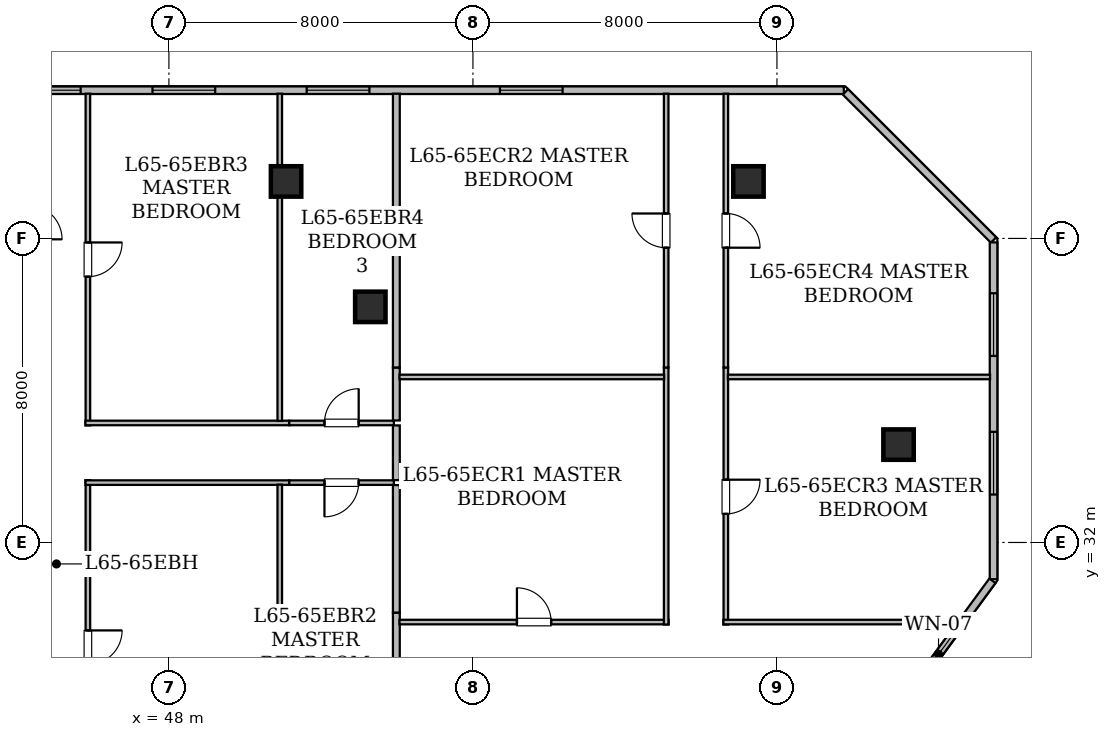
"""IFC4 building model, lengths in metres.
Left out: names, types, materials, properties, quantities, classifications, styles, units other than length and angle.
Written with IfcOpenShell. Run it as: python <this file> out.ifc"""

import sys

from ifc_helpers import new_model, si_unit, direction, frame, frame_2d, origin, origin_2d, place, context, subcontext, project, spatial, rectangle, hollow_rectangle, extrude, element, fill, save


model = new_model("IFC4")
c1 = context("Model", 3, precision=1e-05, world=origin(), true_north=direction((0.0, 1.0)))
c2 = subcontext(c1, "Body", "Model", "MODEL_VIEW")
j1 = project(units=[si_unit("LENGTHUNIT", "METRE"), si_unit("PLANEANGLEUNIT", "RADIAN")], contexts=[c1])
p1 = place(None, origin())
s1 = spatial("IfcSite", under=j1, at=p1, CompositionType="ELEMENT")
p2 = place(p1, origin())
s2 = spatial("IfcBuilding", under=s1, at=p2, CompositionType="ELEMENT")
p3 = place(p2, frame((0.0, 0.0, 253.7)))
s3 = spatial("IfcBuildingStorey", under=s2, at=p3, CompositionType="ELEMENT", Elevation=253.7)
for number, where, z_axis, x_axis in (
    (1, (51.083, 41.5, 0.0), (0.0, 0.0, 1.0), (1.0, 0.0, 0.0)),
    (2, (63.25, 41.5, 0.0), (0.0, 0.0, 1.0), (1.0, 0.0, 0.0)),
    (3, (67.2, 34.575, 0.0), (0.0, 0.0, 1.0), (1.0, 0.0, 0.0)),
    (4, (53.3, 38.2, 0.0), (0.0, 0.0, 1.0), (1.0, 0.0, 0.0)),
):
    element("IfcColumn", number, at=place(p3, frame(where, z_axis=z_axis, x_axis=x_axis)), inside=s3, PredefinedType="COLUMN", context=c2, shape_type="SweptSolid", body=[
        extrude(hollow_rectangle(XDim=0.8, YDim=0.8, WallThickness=0.04, at=origin_2d()), origin(), (0.0, 0.0, 1.0), 3.65),
    ])
p4 = place(p3, frame((24.302, 43.9, 0.0), z_axis=(0.0, 0.0, 1.0), x_axis=(1.0, 0.0, 0.0)))
e5 = element("IfcWall", 5, at=p4, inside=s3, PredefinedType="STANDARD", context=c2, shape_type="SweptSolid", body=[
    extrude(rectangle(XDim=41.457, YDim=0.2, at=frame_2d((20.729, 0.0))), origin(), (0.0, 0.0, 1.0), 3.43),
])
p5 = place(p4, frame((4.673, 0.0, 0.85)))
e6 = element("IfcOpeningElement", 6, at=p5, cuts=e5, PredefinedType="OPENING", context=c2, shape_type="SweptSolid", body=[
    extrude(rectangle(XDim=1.65, YDim=1.55, at=frame_2d((0.825, 0.775))), frame((0.0, 0.11, 0.0), z_axis=(0.0, -1.0, 0.0), x_axis=(1.0, 0.0, 0.0)), (0.0, 0.0, 1.0), 0.22),
])
p6 = place(p4, frame((12.063, 0.0, 0.85)))
e7 = element("IfcOpeningElement", 7, at=p6, cuts=e5, PredefinedType="OPENING", context=c2, shape_type="SweptSolid", body=[
    extrude(rectangle(XDim=1.65, YDim=1.55, at=frame_2d((0.825, 0.775))), frame((0.0, 0.11, 0.0), z_axis=(0.0, -1.0, 0.0), x_axis=(1.0, 0.0, 0.0)), (0.0, 0.0, 1.0), 0.22),
])
p7 = place(p4, frame((14.905, 0.0, 0.85)))
e8 = element("IfcOpeningElement", 8, at=p7, cuts=e5, PredefinedType="OPENING", context=c2, shape_type="SweptSolid", body=[
    extrude(rectangle(XDim=1.65, YDim=1.55, at=frame_2d((0.825, 0.775))), frame((0.0, 0.11, 0.0), z_axis=(0.0, -1.0, 0.0), x_axis=(1.0, 0.0, 0.0)), (0.0, 0.0, 1.0), 0.22),
])
p8 = place(p4, frame((17.825, 0.0, 0.85)))
e9 = element("IfcOpeningElement", 9, at=p8, cuts=e5, PredefinedType="OPENING", context=c2, shape_type="SweptSolid", body=[
    extrude(rectangle(XDim=1.65, YDim=1.55, at=frame_2d((0.825, 0.775))), frame((0.0, 0.11, 0.0), z_axis=(0.0, -1.0, 0.0), x_axis=(1.0, 0.0, 0.0)), (0.0, 0.0, 1.0), 0.22),
])
p9 = place(p4, frame((20.176, 0.0, 0.8)))
e10 = element("IfcOpeningElement", 10, at=p9, cuts=e5, PredefinedType="OPENING", context=c2, shape_type="SweptSolid", body=[
    extrude(rectangle(XDim=1.2, YDim=1.5, at=frame_2d((0.6, 0.75))), frame((0.0, 0.11, 0.0), z_axis=(0.0, -1.0, 0.0), x_axis=(1.0, 0.0, 0.0)), (0.0, 0.0, 1.0), 0.22),
])
p10 = place(p4, frame((23.266, 0.0, 0.85)))
e11 = element("IfcOpeningElement", 11, at=p10, cuts=e5, PredefinedType="OPENING", context=c2, shape_type="SweptSolid", body=[
    extrude(rectangle(XDim=1.65, YDim=1.55, at=frame_2d((0.825, 0.775))), frame((0.0, 0.11, 0.0), z_axis=(0.0, -1.0, 0.0), x_axis=(1.0, 0.0, 0.0)), (0.0, 0.0, 1.0), 0.22),
])
p11 = place(p4, frame((27.324, 0.0, 0.85)))
e12 = element("IfcOpeningElement", 12, at=p11, cuts=e5, PredefinedType="OPENING", context=c2, shape_type="SweptSolid", body=[
    extrude(rectangle(XDim=1.65, YDim=1.55, at=frame_2d((0.825, 0.775))), frame((0.0, 0.11, 0.0), z_axis=(0.0, -1.0, 0.0), x_axis=(1.0, 0.0, 0.0)), (0.0, 0.0, 1.0), 0.22),
])
p12 = place(p4, frame((32.408, 0.0, 0.85)))
e13 = element("IfcOpeningElement", 13, at=p12, cuts=e5, PredefinedType="OPENING", context=c2, shape_type="SweptSolid", body=[
    extrude(rectangle(XDim=1.65, YDim=1.55, at=frame_2d((0.825, 0.775))), frame((0.0, 0.11, 0.0), z_axis=(0.0, -1.0, 0.0), x_axis=(1.0, 0.0, 0.0)), (0.0, 0.0, 1.0), 0.22),
])
p13 = place(p3, frame((65.802, 43.857, 0.0), z_axis=(0.0, 0.0, 1.0), x_axis=(0.707106781187, -0.707106781187, 0.0)))
e14 = element("IfcWall", 14, at=p13, inside=s3, PredefinedType="STANDARD", context=c2, shape_type="SweptSolid", body=[
    extrude(rectangle(XDim=5.512, YDim=0.2, at=frame_2d((2.756, 0.0))), origin(), (0.0, 0.0, 1.0), 3.43),
])
p14 = place(p3, frame((69.7, 39.896, 0.0), z_axis=(0.0, 0.0, 1.0), x_axis=(0.0, -1.0, 0.0)))
e15 = element("IfcWall", 15, at=p14, inside=s3, PredefinedType="STANDARD", context=c2, shape_type="SweptSolid", body=[
    extrude(rectangle(XDim=8.863, YDim=0.2, at=frame_2d((4.432, 0.0))), origin(), (0.0, 0.0, 1.0), 3.43),
])
p15 = place(p14, frame((4.985, 0.0, 0.85)))
e16 = element("IfcOpeningElement", 16, at=p15, cuts=e15, PredefinedType="OPENING", context=c2, shape_type="SweptSolid", body=[
    extrude(rectangle(XDim=1.65, YDim=1.55, at=frame_2d((0.825, 0.775))), frame((0.0, 0.11, 0.0), z_axis=(0.0, -1.0, 0.0), x_axis=(1.0, 0.0, 0.0)), (0.0, 0.0, 1.0), 0.22),
])
p16 = place(p14, frame((1.338, 0.0, 0.85)))
e17 = element("IfcOpeningElement", 17, at=p16, cuts=e15, PredefinedType="OPENING", context=c2, shape_type="SweptSolid", body=[
    extrude(rectangle(XDim=1.65, YDim=1.55, at=frame_2d((0.825, 0.775))), frame((0.0, 0.11, 0.0), z_axis=(0.0, -1.0, 0.0), x_axis=(1.0, 0.0, 0.0)), (0.0, 0.0, 1.0), 0.22),
])
p17 = place(p3, frame((69.67, 30.992, 0.0), z_axis=(0.0, 0.0, 1.0), x_axis=(-0.591320870733, -0.806436375566, 0.0)))
e18 = element("IfcWall", 18, at=p17, inside=s3, PredefinedType="STANDARD", context=c2, shape_type="SweptSolid", body=[
    extrude(rectangle(XDim=3.71, YDim=0.2, at=frame_2d((1.855, 0.0))), origin(), (0.0, 0.0, 1.0), 3.43),
])
p18 = place(p17, frame((1.723, 0.0, 0.85)))
e19 = element("IfcOpeningElement", 19, at=p18, cuts=e18, PredefinedType="OPENING", context=c2, shape_type="SweptSolid", body=[
    extrude(rectangle(XDim=1.35, YDim=1.5, at=frame_2d((0.675, 0.75))), frame((0.0, 0.11, 0.0), z_axis=(0.0, -1.0, 0.0), x_axis=(1.0, 0.0, 0.0)), (0.0, 0.0, 1.0), 0.22),
])
p19 = place(p3, frame((45.868, 33.64, 0.0), z_axis=(0.0, 0.0, 1.0), x_axis=(0.0, -1.0, 0.0)))
e20 = element("IfcWall", 20, at=p19, inside=s3, PredefinedType="PARTITIONING", context=c2, shape_type="SweptSolid", body=[
    extrude(rectangle(XDim=8.808, YDim=0.12, at=frame_2d((4.404, 0.0))), origin(), (0.0, 0.0, 1.0), 3.013),
])
p20 = place(p19, frame((3.954, 0.0, 0.0)))
e21 = element("IfcOpeningElement", 21, at=p20, cuts=e20, PredefinedType="OPENING", context=c2, shape_type="SweptSolid", body=[
    extrude(rectangle(XDim=0.9, YDim=2.1, at=frame_2d((0.45, 1.05))), frame((0.0, 0.07, 0.0), z_axis=(0.0, -1.0, 0.0), x_axis=(1.0, 0.0, 0.0)), (0.0, 0.0, 1.0), 0.14),
])
p21 = place(p3, frame((51.167, 33.575, 0.0), z_axis=(0.0, 0.0, 1.0), x_axis=(-1.0, 0.0, 0.0)))
e22 = element("IfcWall", 22, at=p21, inside=s3, PredefinedType="PARTITIONING", context=c2, shape_type="SweptSolid", body=[
    extrude(rectangle(XDim=5.364, YDim=0.12, at=frame_2d((2.682, 0.0))), origin(), (0.0, 0.0, 1.0), 3.013),
])
p22 = place(p3, frame((53.92, 33.575, 0.0), z_axis=(0.0, 0.0, 1.0), x_axis=(-1.0, 0.0, 0.0)))
e23 = element("IfcWall", 23, at=p22, inside=s3, PredefinedType="PARTITIONING", context=c2, shape_type="SweptSolid", body=[
    extrude(rectangle(XDim=2.753, YDim=0.12, at=frame_2d((1.376, 0.0))), origin(), (0.0, 0.0, 1.0), 2.725),
])
p23 = place(p22, frame((0.927, 0.0, 0.0)))
e24 = element("IfcOpeningElement", 24, at=p23, cuts=e23, PredefinedType="OPENING", context=c2, shape_type="SweptSolid", body=[
    extrude(rectangle(XDim=0.9, YDim=2.1, at=frame_2d((0.45, 1.05))), frame((0.0, 0.07, 0.0), z_axis=(0.0, -1.0, 0.0), x_axis=(1.0, 0.0, 0.0)), (0.0, 0.0, 1.0), 0.14),
])
p24 = place(p3, frame((45.868, 43.808, 0.0), z_axis=(0.0, 0.0, 1.0), x_axis=(0.0, -1.0, 0.0)))
e25 = element("IfcWall", 25, at=p24, inside=s3, PredefinedType="PARTITIONING", context=c2, shape_type="SweptSolid", body=[
    extrude(rectangle(XDim=8.728, YDim=0.12, at=frame_2d((4.364, 0.0))), origin(), (0.0, 0.0, 1.0), 2.725),
])
p25 = place(p24, frame((3.914, 0.0, 0.0)))
e26 = element("IfcOpeningElement", 26, at=p25, cuts=e25, PredefinedType="OPENING", context=c2, shape_type="SweptSolid", body=[
    extrude(rectangle(XDim=0.9, YDim=2.1, at=frame_2d((0.45, 1.05))), frame((0.0, 0.07, 0.0), z_axis=(0.0, -1.0, 0.0), x_axis=(1.0, 0.0, 0.0)), (0.0, 0.0, 1.0), 0.14),
])
p26 = place(p3, frame((45.803, 35.145, 0.0), z_axis=(0.0, 0.0, 1.0), x_axis=(1.0, 0.0, 0.0)))
e27 = element("IfcWall", 27, at=p26, inside=s3, PredefinedType="PARTITIONING", context=c2, shape_type="SweptSolid", body=[
    extrude(rectangle(XDim=5.364, YDim=0.12, at=frame_2d((2.682, 0.0))), origin(), (0.0, 0.0, 1.0), 3.43),
])
p27 = place(p3, frame((51.167, 35.145, 0.0), z_axis=(0.0, 0.0, 1.0), x_axis=(1.0, 0.0, 0.0)))
e28 = element("IfcWall", 28, at=p27, inside=s3, PredefinedType="PARTITIONING", context=c2, shape_type="SweptSolid", body=[
    extrude(rectangle(XDim=2.753, YDim=0.12, at=frame_2d((1.376, 0.0))), origin(), (0.0, 0.0, 1.0), 2.725),
])
p28 = place(p27, frame((0.927, 0.0, 0.0)))
e29 = element("IfcOpeningElement", 29, at=p28, cuts=e28, PredefinedType="OPENING", context=c2, shape_type="SweptSolid", body=[
    extrude(rectangle(XDim=0.9, YDim=2.1, at=frame_2d((0.45, 1.05))), frame((0.0, 0.07, 0.0), z_axis=(0.0, -1.0, 0.0), x_axis=(1.0, 0.0, 0.0)), (0.0, 0.0, 1.0), 0.14),
])
p29 = place(p3, frame((53.985, 35.08, 0.0), z_axis=(0.0, 0.0, 1.0), x_axis=(0.0, -1.0, 0.0)))
e30 = element("IfcWall", 30, at=p29, inside=s3, PredefinedType="STANDARD", context=c2, shape_type="SweptSolid", body=[
    extrude(rectangle(XDim=1.44, YDim=0.18, at=frame_2d((0.72, 0.0))), origin(), (0.0, 0.0, 1.0), 3.43),
])
p30 = place(p3, frame((50.917, 33.521, 0.0), z_axis=(0.0, 0.0, 1.0), x_axis=(0.0, -1.0, 0.0)))
e31 = element("IfcWall", 31, at=p30, inside=s3, PredefinedType="PARTITIONING", context=c2, shape_type="SweptSolid", body=[
    extrude(rectangle(XDim=8.689, YDim=0.12, at=frame_2d((4.344, 0.0))), origin(), (0.0, 0.0, 1.0), 3.013),
])
p31 = place(p3, frame((53.985, 30.155, 0.0), z_axis=(0.0, 0.0, 1.0), x_axis=(0.0, -1.0, 0.0)))
e32 = element("IfcWall", 32, at=p31, inside=s3, PredefinedType="STANDARD", context=c2, shape_type="SweptSolid", body=[
    extrude(rectangle(XDim=2.078, YDim=0.18, at=frame_2d((1.039, 0.0))), origin(), (0.0, 0.0, 1.0), 3.43),
])
p32 = place(p3, frame((53.985, 33.51, 0.0), z_axis=(0.0, 0.0, 1.0), x_axis=(0.0, -1.0, 0.0)))
e33 = element("IfcWall", 33, at=p32, inside=s3, PredefinedType="STANDARD", context=c2, shape_type="SweptSolid", body=[
    extrude(rectangle(XDim=3.355, YDim=0.18, at=frame_2d((1.677, 0.0))), origin(), (0.0, 0.0, 1.0), 3.013),
])
p33 = place(p3, frame((50.917, 43.808, 0.0), z_axis=(0.0, 0.0, 1.0), x_axis=(0.0, -1.0, 0.0)))
e34 = element("IfcWall", 34, at=p33, inside=s3, PredefinedType="PARTITIONING", context=c2, shape_type="SweptSolid", body=[
    extrude(rectangle(XDim=8.609, YDim=0.12, at=frame_2d((4.305, 0.0))), origin(), (0.0, 0.0, 1.0), 2.725),
])
p34 = place(p3, frame((53.985, 36.604, 0.0), z_axis=(0.0, 0.0, 1.0), x_axis=(0.0, -1.0, 0.0)))
e35 = element("IfcWall", 35, at=p34, inside=s3, PredefinedType="STANDARD", context=c2, shape_type="SweptSolid", body=[
    extrude(rectangle(XDim=1.394, YDim=0.18, at=frame_2d((0.697, 0.0))), origin(), (0.0, 0.0, 1.0), 3.43),
])
p35 = place(p3, frame((53.985, 43.808, 0.0), z_axis=(0.0, 0.0, 1.0), x_axis=(0.0, -1.0, 0.0)))
e36 = element("IfcWall", 36, at=p35, inside=s3, PredefinedType="STANDARD", context=c2, shape_type="SweptSolid", body=[
    extrude(rectangle(XDim=7.204, YDim=0.18, at=frame_2d((3.602, 0.0))), origin(), (0.0, 0.0, 1.0), 2.725),
])
p36 = place(p3, frame((54.067, 29.906, 0.0), z_axis=(0.0, 0.0, 1.0), x_axis=(1.0, 0.0, 0.0)))
e37 = element("IfcWall", 37, at=p36, inside=s3, PredefinedType="PARTITIONING", context=c2, shape_type="SweptSolid", body=[
    extrude(rectangle(XDim=7.083, YDim=0.12, at=frame_2d((3.542, 0.0))), origin(), (0.0, 0.0, 1.0), 3.43),
])
p37 = place(p36, frame((3.091, 0.0, 0.0)))
e38 = element("IfcOpeningElement", 38, at=p37, cuts=e37, PredefinedType="OPENING", context=c2, shape_type="SweptSolid", body=[
    extrude(rectangle(XDim=0.9, YDim=2.1, at=frame_2d((0.45, 1.05))), frame((0.0, 0.07, 0.0), z_axis=(0.0, -1.0, 0.0), x_axis=(1.0, 0.0, 0.0)), (0.0, 0.0, 1.0), 0.14),
])
p38 = place(p3, frame((61.085, 29.841, 0.0), z_axis=(0.0, 0.0, 1.0), x_axis=(0.0, 1.0, 0.0)))
e39 = element("IfcWall", 39, at=p38, inside=s3, PredefinedType="PARTITIONING", context=c2, shape_type="SweptSolid", body=[
    extrude(rectangle(XDim=6.763, YDim=0.12, at=frame_2d((3.381, 0.0))), origin(), (0.0, 0.0, 1.0), 2.725),
])
p39 = place(p3, frame((61.085, 36.604, 0.0), z_axis=(0.0, 0.0, 1.0), x_axis=(0.0, 1.0, 0.0)))
e40 = element("IfcWall", 40, at=p39, inside=s3, PredefinedType="PARTITIONING", context=c2, shape_type="SweptSolid", body=[
    extrude(rectangle(XDim=7.204, YDim=0.12, at=frame_2d((3.602, 0.0))), origin(), (0.0, 0.0, 1.0), 2.725),
])
p40 = place(p39, frame((3.152, 0.0, 0.0)))
e41 = element("IfcOpeningElement", 41, at=p40, cuts=e40, PredefinedType="OPENING", context=c2, shape_type="SweptSolid", body=[
    extrude(rectangle(XDim=0.9, YDim=2.1, at=frame_2d((0.45, 1.05))), frame((0.0, 0.07, 0.0), z_axis=(0.0, -1.0, 0.0), x_axis=(1.0, 0.0, 0.0)), (0.0, 0.0, 1.0), 0.14),
])
p41 = place(p3, frame((62.655, 36.604, 0.0), z_axis=(0.0, 0.0, 1.0), x_axis=(0.0, -1.0, 0.0)))
e42 = element("IfcWall", 42, at=p41, inside=s3, PredefinedType="PARTITIONING", context=c2, shape_type="SweptSolid", body=[
    extrude(rectangle(XDim=6.763, YDim=0.12, at=frame_2d((3.381, 0.0))), origin(), (0.0, 0.0, 1.0), 2.725),
])
p42 = place(p41, frame((2.952, 0.0, 0.0)))
e43 = element("IfcOpeningElement", 43, at=p42, cuts=e42, PredefinedType="OPENING", context=c2, shape_type="SweptSolid", body=[
    extrude(rectangle(XDim=0.9, YDim=2.1, at=frame_2d((0.45, 1.05))), frame((0.0, 0.07, 0.0), z_axis=(0.0, -1.0, 0.0), x_axis=(1.0, 0.0, 0.0)), (0.0, 0.0, 1.0), 0.14),
])
p43 = place(p3, frame((62.59, 29.906, 0.0), z_axis=(0.0, 0.0, 1.0), x_axis=(1.0, 0.0, 0.0)))
e44 = element("IfcWall", 44, at=p43, inside=s3, PredefinedType="PARTITIONING", context=c2, shape_type="SweptSolid", body=[
    extrude(rectangle(XDim=6.18, YDim=0.12, at=frame_2d((3.09, 0.0))), origin(), (0.0, 0.0, 1.0), 2.887),
])
p44 = place(p3, frame((62.655, 43.808, 0.0), z_axis=(0.0, 0.0, 1.0), x_axis=(0.0, -1.0, 0.0)))
e45 = element("IfcWall", 45, at=p44, inside=s3, PredefinedType="PARTITIONING", context=c2, shape_type="SweptSolid", body=[
    extrude(rectangle(XDim=7.204, YDim=0.12, at=frame_2d((3.602, 0.0))), origin(), (0.0, 0.0, 1.0), 2.725),
])
p45 = place(p44, frame((3.152, 0.0, 0.0)))
e46 = element("IfcOpeningElement", 46, at=p45, cuts=e45, PredefinedType="OPENING", context=c2, shape_type="SweptSolid", body=[
    extrude(rectangle(XDim=0.9, YDim=2.1, at=frame_2d((0.45, 1.05))), frame((0.0, 0.07, 0.0), z_axis=(0.0, -1.0, 0.0), x_axis=(1.0, 0.0, 0.0)), (0.0, 0.0, 1.0), 0.14),
])
p46 = place(p3, frame((54.067, 36.355, 0.0), z_axis=(0.0, 0.0, 1.0), x_axis=(1.0, 0.0, 0.0)))
e47 = element("IfcWall", 47, at=p46, inside=s3, PredefinedType="PARTITIONING", context=c2, shape_type="SweptSolid", body=[
    extrude(rectangle(XDim=6.964, YDim=0.12, at=frame_2d((3.482, 0.0))), origin(), (0.0, 0.0, 1.0), 2.725),
])
p47 = place(p3, frame((62.709, 36.355, 0.0), z_axis=(0.0, 0.0, 1.0), x_axis=(1.0, 0.0, 0.0)))
e48 = element("IfcWall", 48, at=p47, inside=s3, PredefinedType="PARTITIONING", context=c2, shape_type="SweptSolid", body=[
    extrude(rectangle(XDim=6.899, YDim=0.12, at=frame_2d((3.449, 0.0))), origin(), (0.0, 0.0, 1.0), 2.887),
])
p48 = place(p9, origin())
e49 = element("IfcWindow", 49, at=p48, inside=s3, PartitioningType="SINGLE_PANEL", PredefinedType="WINDOW", context=c2, shape_type="SweptSolid", body=[
    extrude(rectangle(XDim=1.2, YDim=1.5, at=frame_2d((0.6, 0.75))), frame((0.0, 0.03, 0.0), z_axis=(0.0, -1.0, 0.0), x_axis=(1.0, 0.0, 0.0)), (0.0, 0.0, 1.0), 0.06),
])
fill(e10, e49)
p49 = place(p10, origin())
e50 = element("IfcWindow", 50, at=p49, inside=s3, PartitioningType="SINGLE_PANEL", PredefinedType="WINDOW", context=c2, shape_type="SweptSolid", body=[
    extrude(rectangle(XDim=1.65, YDim=1.55, at=frame_2d((0.825, 0.775))), frame((0.0, 0.03, 0.0), z_axis=(0.0, -1.0, 0.0), x_axis=(1.0, 0.0, 0.0)), (0.0, 0.0, 1.0), 0.06),
])
fill(e11, e50)
p50 = place(p11, origin())
e51 = element("IfcWindow", 51, at=p50, inside=s3, PartitioningType="SINGLE_PANEL", PredefinedType="WINDOW", context=c2, shape_type="SweptSolid", body=[
    extrude(rectangle(XDim=1.65, YDim=1.55, at=frame_2d((0.825, 0.775))), frame((0.0, 0.03, 0.0), z_axis=(0.0, -1.0, 0.0), x_axis=(1.0, 0.0, 0.0)), (0.0, 0.0, 1.0), 0.06),
])
fill(e12, e51)
p51 = place(p18, origin())
e52 = element("IfcWindow", 52, at=p51, inside=s3, PartitioningType="SINGLE_PANEL", PredefinedType="WINDOW", context=c2, shape_type="SweptSolid", body=[
    extrude(rectangle(XDim=1.35, YDim=1.5, at=frame_2d((0.675, 0.75))), frame((0.0, 0.03, 0.0), z_axis=(0.0, -1.0, 0.0), x_axis=(1.0, 0.0, 0.0)), (0.0, 0.0, 1.0), 0.06),
])
fill(e19, e52)
p52 = place(p12, origin())
e53 = element("IfcWindow", 53, at=p52, inside=s3, PartitioningType="SINGLE_PANEL", PredefinedType="WINDOW", context=c2, shape_type="SweptSolid", body=[
    extrude(rectangle(XDim=1.65, YDim=1.55, at=frame_2d((0.825, 0.775))), frame((0.0, 0.03, 0.0), z_axis=(0.0, -1.0, 0.0), x_axis=(1.0, 0.0, 0.0)), (0.0, 0.0, 1.0), 0.06),
])
fill(e13, e53)
p53 = place(p15, origin())
e54 = element("IfcWindow", 54, at=p53, inside=s3, PartitioningType="SINGLE_PANEL", PredefinedType="WINDOW", context=c2, shape_type="SweptSolid", body=[
    extrude(rectangle(XDim=1.65, YDim=1.55, at=frame_2d((0.825, 0.775))), frame((0.0, 0.03, 0.0), z_axis=(0.0, -1.0, 0.0), x_axis=(1.0, 0.0, 0.0)), (0.0, 0.0, 1.0), 0.06),
])
fill(e16, e54)
p54 = place(p16, origin())
e55 = element("IfcWindow", 55, at=p54, inside=s3, PartitioningType="SINGLE_PANEL", PredefinedType="WINDOW", context=c2, shape_type="SweptSolid", body=[
    extrude(rectangle(XDim=1.65, YDim=1.55, at=frame_2d((0.825, 0.775))), frame((0.0, 0.03, 0.0), z_axis=(0.0, -1.0, 0.0), x_axis=(1.0, 0.0, 0.0)), (0.0, 0.0, 1.0), 0.06),
])
fill(e17, e55)
p55 = place(p20, origin())
e56 = element("IfcDoor", 56, at=p55, inside=s3, OperationType="SINGLE_SWING_LEFT", PredefinedType="DOOR", context=c2, shape_type="SweptSolid", body=[
    extrude(rectangle(XDim=0.9, YDim=2.1, at=frame_2d((0.45, 1.05))), frame((0.0, 0.025, 0.0), z_axis=(0.0, -1.0, 0.0), x_axis=(1.0, 0.0, 0.0)), (0.0, 0.0, 1.0), 0.05),
])
fill(e21, e56)
p56 = place(p23, origin())
e57 = element("IfcDoor", 57, at=p56, inside=s3, OperationType="SINGLE_SWING_RIGHT", PredefinedType="DOOR", context=c2, shape_type="SweptSolid", body=[
    extrude(rectangle(XDim=0.9, YDim=2.1, at=frame_2d((0.45, 1.05))), frame((0.0, 0.025, 0.0), z_axis=(0.0, -1.0, 0.0), x_axis=(1.0, 0.0, 0.0)), (0.0, 0.0, 1.0), 0.05),
])
fill(e24, e57)
p57 = place(p25, origin())
e58 = element("IfcDoor", 58, at=p57, inside=s3, OperationType="SINGLE_SWING_LEFT", PredefinedType="DOOR", context=c2, shape_type="SweptSolid", body=[
    extrude(rectangle(XDim=0.9, YDim=2.1, at=frame_2d((0.45, 1.05))), frame((0.0, 0.025, 0.0), z_axis=(0.0, -1.0, 0.0), x_axis=(1.0, 0.0, 0.0)), (0.0, 0.0, 1.0), 0.05),
])
fill(e26, e58)
p58 = place(p28, origin())
e59 = element("IfcDoor", 59, at=p58, inside=s3, OperationType="SINGLE_SWING_RIGHT", PredefinedType="DOOR", context=c2, shape_type="SweptSolid", body=[
    extrude(rectangle(XDim=0.9, YDim=2.1, at=frame_2d((0.45, 1.05))), frame((0.0, 0.025, 0.0), z_axis=(0.0, -1.0, 0.0), x_axis=(1.0, 0.0, 0.0)), (0.0, 0.0, 1.0), 0.05),
])
fill(e29, e59)
p59 = place(p37, origin())
e60 = element("IfcDoor", 60, at=p59, inside=s3, OperationType="SINGLE_SWING_LEFT", PredefinedType="DOOR", context=c2, shape_type="SweptSolid", body=[
    extrude(rectangle(XDim=0.9, YDim=2.1, at=frame_2d((0.45, 1.05))), frame((0.0, 0.025, 0.0), z_axis=(0.0, -1.0, 0.0), x_axis=(1.0, 0.0, 0.0)), (0.0, 0.0, 1.0), 0.05),
])
fill(e38, e60)
p60 = place(p40, origin())
e61 = element("IfcDoor", 61, at=p60, inside=s3, OperationType="SINGLE_SWING_RIGHT", PredefinedType="DOOR", context=c2, shape_type="SweptSolid", body=[
    extrude(rectangle(XDim=0.9, YDim=2.1, at=frame_2d((0.45, 1.05))), frame((0.0, 0.025, 0.0), z_axis=(0.0, -1.0, 0.0), x_axis=(1.0, 0.0, 0.0)), (0.0, 0.0, 1.0), 0.05),
])
fill(e41, e61)
p61 = place(p42, origin())
e62 = element("IfcDoor", 62, at=p61, inside=s3, OperationType="SINGLE_SWING_LEFT", PredefinedType="DOOR", context=c2, shape_type="SweptSolid", body=[
    extrude(rectangle(XDim=0.9, YDim=2.1, at=frame_2d((0.45, 1.05))), frame((0.0, 0.025, 0.0), z_axis=(0.0, -1.0, 0.0), x_axis=(1.0, 0.0, 0.0)), (0.0, 0.0, 1.0), 0.05),
])
fill(e43, e62)
p62 = place(p45, origin())
e63 = element("IfcDoor", 63, at=p62, inside=s3, OperationType="SINGLE_SWING_RIGHT", PredefinedType="DOOR", context=c2, shape_type="SweptSolid", body=[
    extrude(rectangle(XDim=0.9, YDim=2.1, at=frame_2d((0.45, 1.05))), frame((0.0, 0.025, 0.0), z_axis=(0.0, -1.0, 0.0), x_axis=(1.0, 0.0, 0.0)), (0.0, 0.0, 1.0), 0.05),
])
fill(e46, e63)
save(model, sys.argv[1])
